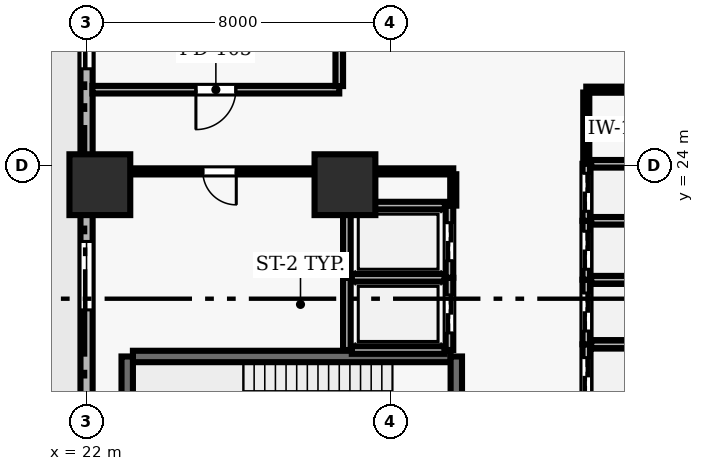
"""IFC4 building model, lengths in metres.
Left out: names, types, materials, properties, quantities, classifications, styles, units other than length and angle.
Written with IfcOpenShell. Run it as: python <this file> out.ifc"""

import sys

from ifc_helpers import new_model, si_unit, direction, frame, frame_2d, origin, origin_2d, place, context, subcontext, project, spatial, rectangle, extrude, element, fill, save


model = new_model("IFC4")
c1 = context("Model", 3, precision=1e-05, world=origin(), true_north=direction((0.0, 1.0)))
c2 = subcontext(c1, "Body", "Model", "MODEL_VIEW")
j1 = project(units=[si_unit("LENGTHUNIT", "METRE"), si_unit("PLANEANGLEUNIT", "RADIAN")], contexts=[c1])
p1 = place(None, origin())
s1 = spatial("IfcSite", under=j1, at=p1, CompositionType="ELEMENT")
p2 = place(p1, origin())
s2 = spatial("IfcBuilding", under=s1, at=p2, CompositionType="ELEMENT")
p3 = place(p2, origin())
s3 = spatial("IfcBuildingStorey", under=s2, at=p3, CompositionType="ELEMENT", Elevation=0.0)
for number, where, z_axis, x_axis in (
    (1, (22.35, 23.5, 0.0), (0.0, 0.0, 1.0), (1.0, 0.0, 0.0)),
    (2, (28.8, 23.5, 0.0), (0.0, 0.0, 1.0), (1.0, 0.0, 0.0)),
):
    element("IfcColumn", number, at=place(p3, frame(where, z_axis=z_axis, x_axis=x_axis)), inside=s3, PredefinedType="COLUMN", context=c2, shape_type="SweptSolid", body=[
        extrude(rectangle(XDim=1.6, YDim=1.6, at=origin_2d()), origin(), (0.0, 0.0, 1.0), 5.2),
    ])
p4 = place(p3, frame((22.0, 51.5, 0.0), z_axis=(0.0, 0.0, 1.0), x_axis=(0.0, -1.0, 0.0)))
e3 = element("IfcWall", 3, at=p4, inside=s3, PredefinedType="SOLIDWALL", context=c2, shape_type="SweptSolid", body=[
    extrude(rectangle(XDim=49.0, YDim=0.32, at=frame_2d((24.5, 0.0))), origin(), (0.0, 0.0, 1.0), 4.92),
])
p5 = place(p4, frame((11.4, 0.0, 0.0)))
e4 = element("IfcOpeningElement", 4, at=p5, cuts=e3, PredefinedType="OPENING", context=c2, shape_type="SweptSolid", body=[
    extrude(rectangle(XDim=1.8, YDim=2.4, at=frame_2d((0.9, 1.2))), frame((0.0, 0.17, 0.0), z_axis=(0.0, -1.0, 0.0), x_axis=(1.0, 0.0, 0.0)), (0.0, 0.0, 1.0), 0.34),
])
p6 = place(p4, frame((18.4, 0.0, 0.0)))
e5 = element("IfcOpeningElement", 5, at=p6, cuts=e3, PredefinedType="OPENING", context=c2, shape_type="SweptSolid", body=[
    extrude(rectangle(XDim=1.8, YDim=2.4, at=frame_2d((0.9, 1.2))), frame((0.0, 0.17, 0.0), z_axis=(0.0, -1.0, 0.0), x_axis=(1.0, 0.0, 0.0)), (0.0, 0.0, 1.0), 0.34),
])
p7 = place(p4, frame((1.822, 0.0, 0.9)))
e6 = element("IfcOpeningElement", 6, at=p7, cuts=e3, PredefinedType="OPENING", context=c2, shape_type="SweptSolid", body=[
    extrude(rectangle(XDim=1.8, YDim=2.2, at=frame_2d((0.9, 1.1))), frame((0.0, 0.17, 0.0), z_axis=(0.0, -1.0, 0.0), x_axis=(1.0, 0.0, 0.0)), (0.0, 0.0, 1.0), 0.34),
])
p8 = place(p4, frame((7.267, 0.0, 0.9)))
e7 = element("IfcOpeningElement", 7, at=p8, cuts=e3, PredefinedType="OPENING", context=c2, shape_type="SweptSolid", body=[
    extrude(rectangle(XDim=1.8, YDim=2.2, at=frame_2d((0.9, 1.1))), frame((0.0, 0.17, 0.0), z_axis=(0.0, -1.0, 0.0), x_axis=(1.0, 0.0, 0.0)), (0.0, 0.0, 1.0), 0.34),
])
p9 = place(p4, frame((23.15, 0.0, 0.9)))
e8 = element("IfcOpeningElement", 8, at=p9, cuts=e3, PredefinedType="OPENING", context=c2, shape_type="SweptSolid", body=[
    extrude(rectangle(XDim=1.8, YDim=2.2, at=frame_2d((0.9, 1.1))), frame((0.0, 0.17, 0.0), z_axis=(0.0, -1.0, 0.0), x_axis=(1.0, 0.0, 0.0)), (0.0, 0.0, 1.0), 0.34),
])
p10 = place(p4, frame((29.494, 0.0, 0.9)))
e9 = element("IfcOpeningElement", 9, at=p10, cuts=e3, PredefinedType="OPENING", context=c2, shape_type="SweptSolid", body=[
    extrude(rectangle(XDim=1.8, YDim=2.2, at=frame_2d((0.9, 1.1))), frame((0.0, 0.17, 0.0), z_axis=(0.0, -1.0, 0.0), x_axis=(1.0, 0.0, 0.0)), (0.0, 0.0, 1.0), 0.34),
])
p11 = place(p4, frame((34.039, 0.0, 0.9)))
e10 = element("IfcOpeningElement", 10, at=p11, cuts=e3, PredefinedType="OPENING", context=c2, shape_type="SweptSolid", body=[
    extrude(rectangle(XDim=1.8, YDim=2.2, at=frame_2d((0.9, 1.1))), frame((0.0, 0.17, 0.0), z_axis=(0.0, -1.0, 0.0), x_axis=(1.0, 0.0, 0.0)), (0.0, 0.0, 1.0), 0.34),
])
p12 = place(p4, frame((39.933, 0.0, 0.9)))
e11 = element("IfcOpeningElement", 11, at=p12, cuts=e3, PredefinedType="OPENING", context=c2, shape_type="SweptSolid", body=[
    extrude(rectangle(XDim=1.8, YDim=2.2, at=frame_2d((0.9, 1.1))), frame((0.0, 0.17, 0.0), z_axis=(0.0, -1.0, 0.0), x_axis=(1.0, 0.0, 0.0)), (0.0, 0.0, 1.0), 0.34),
])
p13 = place(p3, frame((31.58, 18.98, 0.0), z_axis=(0.0, 0.0, 1.0), x_axis=(-1.0, 0.0, 0.0)))
e12 = element("IfcWall", 12, at=p13, inside=s3, PredefinedType="SHEAR", context=c2, shape_type="SweptSolid", body=[
    extrude(rectangle(XDim=8.36, YDim=0.3, at=frame_2d((4.18, 0.0))), origin(), (0.0, 0.0, 1.0), 4.92),
])
p14 = place(p3, frame((23.07, 18.98, 0.0), z_axis=(0.0, 0.0, 1.0), x_axis=(0.0, -1.0, 0.0)))
e13 = element("IfcWall", 13, at=p14, inside=s3, PredefinedType="SHEAR", context=c2, shape_type="SweptSolid", body=[
    extrude(rectangle(XDim=3.51, YDim=0.3, at=frame_2d((1.755, 0.0))), origin(), (0.0, 0.0, 1.0), 4.92),
])
p15 = place(p3, frame((31.73, 15.47, 0.0), z_axis=(0.0, 0.0, 1.0), x_axis=(0.0, 1.0, 0.0)))
e14 = element("IfcWall", 14, at=p15, inside=s3, PredefinedType="SHEAR", context=c2, shape_type="SweptSolid", body=[
    extrude(rectangle(XDim=3.51, YDim=0.3, at=frame_2d((1.755, 0.0))), origin(), (0.0, 0.0, 1.0), 4.92),
])
p16 = place(p15, frame((1.18, 0.0, 0.0)))
e15 = element("IfcOpeningElement", 15, at=p16, cuts=e14, PredefinedType="OPENING", context=c2, shape_type="SweptSolid", body=[
    extrude(rectangle(XDim=1.15, YDim=2.15, at=frame_2d((0.575, 1.075))), frame((0.0, 0.16, 0.0), z_axis=(0.0, -1.0, 0.0), x_axis=(1.0, 0.0, 0.0)), (0.0, 0.0, 1.0), 0.32),
])
p17 = place(p3, frame((35.15, 19.3, 0.0), z_axis=(0.0, 0.0, 1.0), x_axis=(0.0, -1.0, 0.0)))
e16 = element("IfcWall", 16, at=p17, inside=s3, PredefinedType="SOLIDWALL", context=c2, shape_type="SweptSolid", body=[
    extrude(rectangle(XDim=1.7, YDim=0.2, at=frame_2d((0.85, 0.0))), origin(), (0.0, 0.0, 1.0), 4.92),
])
p18 = place(p17, frame((0.35, 0.0, 0.0)))
e17 = element("IfcOpeningElement", 17, at=p18, cuts=e16, PredefinedType="OPENING", context=c2, shape_type="SweptSolid", body=[
    extrude(rectangle(XDim=1.0, YDim=2.1, at=frame_2d((0.5, 1.05))), frame((0.0, 0.11, 0.0), z_axis=(0.0, -1.0, 0.0), x_axis=(1.0, 0.0, 0.0)), (0.0, 0.0, 1.0), 0.22),
])
p19 = place(p3, frame((37.42, 19.3, 0.0), z_axis=(0.0, 0.0, 1.0), x_axis=(-1.0, 0.0, 0.0)))
e18 = element("IfcWall", 18, at=p19, inside=s3, PredefinedType="SOLIDWALL", context=c2, shape_type="SweptSolid", body=[
    extrude(rectangle(XDim=2.14, YDim=0.2, at=frame_2d((1.07, 0.0))), origin(), (0.0, 0.0, 1.0), 4.92),
])
p20 = place(p3, frame((35.15, 21.0, 0.0), z_axis=(0.0, 0.0, 1.0), x_axis=(0.0, -1.0, 0.0)))
e19 = element("IfcWall", 19, at=p20, inside=s3, PredefinedType="SOLIDWALL", context=c2, shape_type="SweptSolid", body=[
    extrude(rectangle(XDim=1.7, YDim=0.2, at=frame_2d((0.85, 0.0))), origin(), (0.0, 0.0, 1.0), 4.92),
])
p21 = place(p20, frame((0.35, 0.0, 0.0)))
e20 = element("IfcOpeningElement", 20, at=p21, cuts=e19, PredefinedType="OPENING", context=c2, shape_type="SweptSolid", body=[
    extrude(rectangle(XDim=1.0, YDim=2.1, at=frame_2d((0.5, 1.05))), frame((0.0, 0.11, 0.0), z_axis=(0.0, -1.0, 0.0), x_axis=(1.0, 0.0, 0.0)), (0.0, 0.0, 1.0), 0.22),
])
p22 = place(p3, frame((37.42, 21.0, 0.0), z_axis=(0.0, 0.0, 1.0), x_axis=(-1.0, 0.0, 0.0)))
e21 = element("IfcWall", 21, at=p22, inside=s3, PredefinedType="SOLIDWALL", context=c2, shape_type="SweptSolid", body=[
    extrude(rectangle(XDim=2.14, YDim=0.2, at=frame_2d((1.07, 0.0))), origin(), (0.0, 0.0, 1.0), 4.92),
])
p23 = place(p3, frame((28.85, 21.05, 0.0), z_axis=(0.0, 0.0, 1.0), x_axis=(0.0, -1.0, 0.0)))
e22 = element("IfcWall", 22, at=p23, inside=s3, PredefinedType="SOLIDWALL", context=c2, shape_type="SweptSolid", body=[
    extrude(rectangle(XDim=1.9, YDim=0.2, at=frame_2d((0.95, 0.0))), origin(), (0.0, 0.0, 1.0), 4.92),
])
p24 = place(p3, frame((31.55, 19.15, 0.0), z_axis=(0.0, 0.0, 1.0), x_axis=(0.0, 1.0, 0.0)))
e23 = element("IfcWall", 23, at=p24, inside=s3, PredefinedType="SOLIDWALL", context=c2, shape_type="SweptSolid", body=[
    extrude(rectangle(XDim=1.9, YDim=0.2, at=frame_2d((0.95, 0.0))), origin(), (0.0, 0.0, 1.0), 4.92),
])
p25 = place(p24, frame((0.45, 0.0, 0.0)))
e24 = element("IfcOpeningElement", 24, at=p25, cuts=e23, PredefinedType="OPENING", context=c2, shape_type="SweptSolid", body=[
    extrude(rectangle(XDim=1.0, YDim=2.1, at=frame_2d((0.5, 1.05))), frame((0.0, 0.11, 0.0), z_axis=(0.0, -1.0, 0.0), x_axis=(1.0, 0.0, 0.0)), (0.0, 0.0, 1.0), 0.22),
])
for number, where, z_axis, x_axis in (
    (25, (28.98, 19.15, 0.0), (0.0, 0.0, 1.0), (1.0, 0.0, 0.0)),
    (26, (31.42, 21.05, 0.0), (0.0, 0.0, 1.0), (-1.0, 0.0, 0.0)),
):
    element("IfcWall", number, at=place(p3, frame(where, z_axis=z_axis, x_axis=x_axis)), inside=s3, PredefinedType="SOLIDWALL", context=c2, shape_type="SweptSolid", body=[
        extrude(rectangle(XDim=2.44, YDim=0.2, at=frame_2d((1.22, 0.0))), origin(), (0.0, 0.0, 1.0), 4.92),
    ])
p26 = place(p3, frame((35.15, 22.55, 0.0), z_axis=(0.0, 0.0, 1.0), x_axis=(0.0, -1.0, 0.0)))
e27 = element("IfcWall", 27, at=p26, inside=s3, PredefinedType="SOLIDWALL", context=c2, shape_type="SweptSolid", body=[
    extrude(rectangle(XDim=1.55, YDim=0.2, at=frame_2d((0.775, 0.0))), origin(), (0.0, 0.0, 1.0), 4.92),
])
p27 = place(p26, frame((0.275, 0.0, 0.0)))
e28 = element("IfcOpeningElement", 28, at=p27, cuts=e27, PredefinedType="OPENING", context=c2, shape_type="SweptSolid", body=[
    extrude(rectangle(XDim=1.0, YDim=2.1, at=frame_2d((0.5, 1.05))), frame((0.0, 0.11, 0.0), z_axis=(0.0, -1.0, 0.0), x_axis=(1.0, 0.0, 0.0)), (0.0, 0.0, 1.0), 0.22),
])
p28 = place(p3, frame((37.42, 22.55, 0.0), z_axis=(0.0, 0.0, 1.0), x_axis=(-1.0, 0.0, 0.0)))
e29 = element("IfcWall", 29, at=p28, inside=s3, PredefinedType="SOLIDWALL", context=c2, shape_type="SweptSolid", body=[
    extrude(rectangle(XDim=2.14, YDim=0.2, at=frame_2d((1.07, 0.0))), origin(), (0.0, 0.0, 1.0), 4.92),
])
p29 = place(p3, frame((35.15, 24.05, 0.0), z_axis=(0.0, 0.0, 1.0), x_axis=(0.0, -1.0, 0.0)))
e30 = element("IfcWall", 30, at=p29, inside=s3, PredefinedType="SOLIDWALL", context=c2, shape_type="SweptSolid", body=[
    extrude(rectangle(XDim=1.5, YDim=0.2, at=frame_2d((0.75, 0.0))), origin(), (0.0, 0.0, 1.0), 4.92),
])
p30 = place(p29, frame((0.25, 0.0, 0.0)))
e31 = element("IfcOpeningElement", 31, at=p30, cuts=e30, PredefinedType="OPENING", context=c2, shape_type="SweptSolid", body=[
    extrude(rectangle(XDim=1.0, YDim=2.1, at=frame_2d((0.5, 1.05))), frame((0.0, 0.11, 0.0), z_axis=(0.0, -1.0, 0.0), x_axis=(1.0, 0.0, 0.0)), (0.0, 0.0, 1.0), 0.22),
])
p31 = place(p3, frame((37.42, 24.05, 0.0), z_axis=(0.0, 0.0, 1.0), x_axis=(-1.0, 0.0, 0.0)))
e32 = element("IfcWall", 32, at=p31, inside=s3, PredefinedType="SOLIDWALL", context=c2, shape_type="SweptSolid", body=[
    extrude(rectangle(XDim=2.14, YDim=0.2, at=frame_2d((1.07, 0.0))), origin(), (0.0, 0.0, 1.0), 4.92),
])
p32 = place(p3, frame((28.85, 22.95, 0.0), z_axis=(0.0, 0.0, 1.0), x_axis=(0.0, -1.0, 0.0)))
e33 = element("IfcWall", 33, at=p32, inside=s3, PredefinedType="SOLIDWALL", context=c2, shape_type="SweptSolid", body=[
    extrude(rectangle(XDim=1.9, YDim=0.2, at=frame_2d((0.95, 0.0))), origin(), (0.0, 0.0, 1.0), 4.92),
])
p33 = place(p3, frame((31.55, 21.05, 0.0), z_axis=(0.0, 0.0, 1.0), x_axis=(0.0, 1.0, 0.0)))
e34 = element("IfcWall", 34, at=p33, inside=s3, PredefinedType="SOLIDWALL", context=c2, shape_type="SweptSolid", body=[
    extrude(rectangle(XDim=1.9, YDim=0.2, at=frame_2d((0.95, 0.0))), origin(), (0.0, 0.0, 1.0), 4.92),
])
p34 = place(p33, frame((0.45, 0.0, 0.0)))
e35 = element("IfcOpeningElement", 35, at=p34, cuts=e34, PredefinedType="OPENING", context=c2, shape_type="SweptSolid", body=[
    extrude(rectangle(XDim=1.0, YDim=2.1, at=frame_2d((0.5, 1.05))), frame((0.0, 0.11, 0.0), z_axis=(0.0, -1.0, 0.0), x_axis=(1.0, 0.0, 0.0)), (0.0, 0.0, 1.0), 0.22),
])
p35 = place(p3, frame((31.43, 22.95, 0.0), z_axis=(0.0, 0.0, 1.0), x_axis=(-1.0, 0.0, 0.0)))
e36 = element("IfcWall", 36, at=p35, inside=s3, PredefinedType="SOLIDWALL", context=c2, shape_type="SweptSolid", body=[
    extrude(rectangle(XDim=2.46, YDim=0.2, at=frame_2d((1.23, 0.0))), origin(), (0.0, 0.0, 1.0), 4.92),
])
p36 = place(p3, frame((28.65, 26.0, 0.0), z_axis=(0.0, 0.0, 1.0), x_axis=(-1.0, 0.0, 0.0)))
e37 = element("IfcWall", 37, at=p36, inside=s3, PredefinedType="SOLIDWALL", context=c2, shape_type="SweptSolid", body=[
    extrude(rectangle(XDim=6.495, YDim=0.2, at=frame_2d((3.248, 0.0))), origin(), (0.0, 0.0, 1.0), 4.92),
])
p37 = place(p36, frame((2.722, 0.0, 0.0)))
e38 = element("IfcOpeningElement", 38, at=p37, cuts=e37, PredefinedType="OPENING", context=c2, shape_type="SweptSolid", body=[
    extrude(rectangle(XDim=1.05, YDim=2.15, at=frame_2d((0.525, 1.075))), frame((0.0, 0.11, 0.0), z_axis=(0.0, -1.0, 0.0), x_axis=(1.0, 0.0, 0.0)), (0.0, 0.0, 1.0), 0.22),
])
p38 = place(p3, frame((28.8, 23.85, 0.0), z_axis=(0.0, 0.0, 1.0), x_axis=(-1.0, 0.0, 0.0)))
e39 = element("IfcWall", 39, at=p38, inside=s3, PredefinedType="PARTITIONING", context=c2, shape_type="SweptSolid", body=[
    extrude(rectangle(XDim=6.6, YDim=0.16, at=frame_2d((3.3, 0.0))), origin(), (0.0, 0.0, 1.0), 4.065),
])
p39 = place(p38, frame((2.86, 0.0, 0.0)))
e40 = element("IfcOpeningElement", 40, at=p39, cuts=e39, PredefinedType="OPENING", context=c2, shape_type="SweptSolid", body=[
    extrude(rectangle(XDim=0.88, YDim=2.1, at=frame_2d((0.44, 1.05))), frame((0.0, 0.09, 0.0), z_axis=(0.0, -1.0, 0.0), x_axis=(1.0, 0.0, 0.0)), (0.0, 0.0, 1.0), 0.18),
])
p40 = place(p3, frame((28.8, 23.85, 0.0), z_axis=(0.0, 0.0, 1.0), x_axis=(1.0, 0.0, 0.0)))
e41 = element("IfcWall", 41, at=p40, inside=s3, PredefinedType="PARTITIONING", context=c2, shape_type="SweptSolid", body=[
    extrude(rectangle(XDim=2.85, YDim=0.16, at=frame_2d((1.425, 0.0))), origin(), (0.0, 0.0, 1.0), 4.92),
])
p41 = place(p3, frame((35.15, 26.0, 0.0), z_axis=(0.0, 0.0, 1.0), x_axis=(1.0, 0.0, 0.0)))
e42 = element("IfcWall", 42, at=p41, inside=s3, PredefinedType="PARTITIONING", context=c2, shape_type="SweptSolid", body=[
    extrude(rectangle(XDim=3.15, YDim=0.16, at=frame_2d((1.575, 0.0))), origin(), (0.0, 0.0, 1.0), 4.92),
])
p42 = place(p3, frame((28.65, 26.095, 0.0), z_axis=(0.0, 0.0, 1.0), x_axis=(0.0, 1.0, 0.0)))
e43 = element("IfcWall", 43, at=p42, inside=s3, PredefinedType="SOLIDWALL", context=c2, shape_type="SweptSolid", body=[
    extrude(rectangle(XDim=4.41, YDim=0.2, at=frame_2d((2.205, 0.0))), origin(), (0.0, 0.0, 1.0), 4.92),
])
p43 = place(p3, frame((28.8, 22.95, 0.0), z_axis=(0.0, 0.0, 1.0), x_axis=(0.0, 1.0, 0.0)))
e44 = element("IfcWall", 44, at=p43, inside=s3, PredefinedType="PARTITIONING", context=c2, shape_type="SweptSolid", body=[
    extrude(rectangle(XDim=0.825, YDim=0.135, at=frame_2d((0.413, 0.0))), origin(), (0.0, 0.0, 1.0), 4.92),
])
p44 = place(p3, frame((31.65, 23.775, 0.0), z_axis=(0.0, 0.0, 1.0), x_axis=(0.0, -1.0, 0.0)))
e45 = element("IfcWall", 45, at=p44, inside=s3, PredefinedType="PARTITIONING", context=c2, shape_type="SweptSolid", body=[
    extrude(rectangle(XDim=0.825, YDim=0.16, at=frame_2d((0.413, 0.0))), origin(), (0.0, 0.0, 1.0), 4.92),
])
p45 = place(p3, frame((35.15, 24.07, 0.0), z_axis=(0.0, 0.0, 1.0), x_axis=(0.0, 1.0, 0.0)))
e46 = element("IfcWall", 46, at=p45, inside=s3, PredefinedType="PARTITIONING", context=c2, shape_type="SweptSolid", body=[
    extrude(rectangle(XDim=1.855, YDim=0.16, at=frame_2d((0.927, 0.0))), origin(), (0.0, 0.0, 1.0), 4.92),
])
p46 = place(p9, origin())
e47 = element("IfcWindow", 47, at=p46, inside=s3, PartitioningType="SINGLE_PANEL", PredefinedType="WINDOW", context=c2, shape_type="SweptSolid", body=[
    extrude(rectangle(XDim=1.8, YDim=2.2, at=frame_2d((0.9, 1.1))), frame((0.0, 0.03, 0.0), z_axis=(0.0, -1.0, 0.0), x_axis=(1.0, 0.0, 0.0)), (0.0, 0.0, 1.0), 0.06),
])
fill(e8, e47)
p47 = place(p10, origin())
e48 = element("IfcWindow", 48, at=p47, inside=s3, PartitioningType="SINGLE_PANEL", PredefinedType="WINDOW", context=c2, shape_type="SweptSolid", body=[
    extrude(rectangle(XDim=1.8, YDim=2.2, at=frame_2d((0.9, 1.1))), frame((0.0, 0.03, 0.0), z_axis=(0.0, -1.0, 0.0), x_axis=(1.0, 0.0, 0.0)), (0.0, 0.0, 1.0), 0.06),
])
fill(e9, e48)
p48 = place(p18, origin())
e49 = element("IfcDoor", 49, at=p48, inside=s3, OperationType="DOUBLE_DOOR_SLIDING", PredefinedType="DOOR", context=c2, shape_type="SweptSolid", body=[
    extrude(rectangle(XDim=1.0, YDim=2.1, at=frame_2d((0.5, 1.05))), frame((0.0, 0.025, 0.0), z_axis=(0.0, -1.0, 0.0), x_axis=(1.0, 0.0, 0.0)), (0.0, 0.0, 1.0), 0.05),
])
fill(e17, e49)
p49 = place(p21, origin())
e50 = element("IfcDoor", 50, at=p49, inside=s3, OperationType="DOUBLE_DOOR_SLIDING", PredefinedType="DOOR", context=c2, shape_type="SweptSolid", body=[
    extrude(rectangle(XDim=1.0, YDim=2.1, at=frame_2d((0.5, 1.05))), frame((0.0, 0.025, 0.0), z_axis=(0.0, -1.0, 0.0), x_axis=(1.0, 0.0, 0.0)), (0.0, 0.0, 1.0), 0.05),
])
fill(e20, e50)
p50 = place(p25, origin())
e51 = element("IfcDoor", 51, at=p50, inside=s3, OperationType="DOUBLE_DOOR_SLIDING", PredefinedType="DOOR", context=c2, shape_type="SweptSolid", body=[
    extrude(rectangle(XDim=1.0, YDim=2.1, at=frame_2d((0.5, 1.05))), frame((0.0, 0.025, 0.0), z_axis=(0.0, -1.0, 0.0), x_axis=(1.0, 0.0, 0.0)), (0.0, 0.0, 1.0), 0.05),
])
fill(e24, e51)
p51 = place(p27, origin())
e52 = element("IfcDoor", 52, at=p51, inside=s3, OperationType="DOUBLE_DOOR_SLIDING", PredefinedType="DOOR", context=c2, shape_type="SweptSolid", body=[
    extrude(rectangle(XDim=1.0, YDim=2.1, at=frame_2d((0.5, 1.05))), frame((0.0, 0.025, 0.0), z_axis=(0.0, -1.0, 0.0), x_axis=(1.0, 0.0, 0.0)), (0.0, 0.0, 1.0), 0.05),
])
fill(e28, e52)
p52 = place(p30, origin())
e53 = element("IfcDoor", 53, at=p52, inside=s3, OperationType="DOUBLE_DOOR_SLIDING", PredefinedType="DOOR", context=c2, shape_type="SweptSolid", body=[
    extrude(rectangle(XDim=1.0, YDim=2.1, at=frame_2d((0.5, 1.05))), frame((0.0, 0.025, 0.0), z_axis=(0.0, -1.0, 0.0), x_axis=(1.0, 0.0, 0.0)), (0.0, 0.0, 1.0), 0.05),
])
fill(e31, e53)
p53 = place(p34, origin())
e54 = element("IfcDoor", 54, at=p53, inside=s3, OperationType="DOUBLE_DOOR_SLIDING", PredefinedType="DOOR", context=c2, shape_type="SweptSolid", body=[
    extrude(rectangle(XDim=1.0, YDim=2.1, at=frame_2d((0.5, 1.05))), frame((0.0, 0.025, 0.0), z_axis=(0.0, -1.0, 0.0), x_axis=(1.0, 0.0, 0.0)), (0.0, 0.0, 1.0), 0.05),
])
fill(e35, e54)
p54 = place(p39, origin())
e55 = element("IfcDoor", 55, at=p54, inside=s3, OperationType="SINGLE_SWING_LEFT", PredefinedType="DOOR", context=c2, shape_type="SweptSolid", body=[
    extrude(rectangle(XDim=0.88, YDim=2.1, at=frame_2d((0.44, 1.05))), frame((0.0, 0.025, 0.0), z_axis=(0.0, -1.0, 0.0), x_axis=(1.0, 0.0, 0.0)), (0.0, 0.0, 1.0), 0.05),
])
fill(e40, e55)
p55 = place(p37, origin())
e56 = element("IfcDoor", 56, at=p55, inside=s3, OperationType="SINGLE_SWING_RIGHT", PredefinedType="DOOR", context=c2, shape_type="SweptSolid", body=[
    extrude(rectangle(XDim=1.05, YDim=2.15, at=frame_2d((0.525, 1.075))), frame((0.0, 0.025, 0.0), z_axis=(0.0, -1.0, 0.0), x_axis=(1.0, 0.0, 0.0)), (0.0, 0.0, 1.0), 0.05),
])
fill(e38, e56)
save(model, sys.argv[1])
